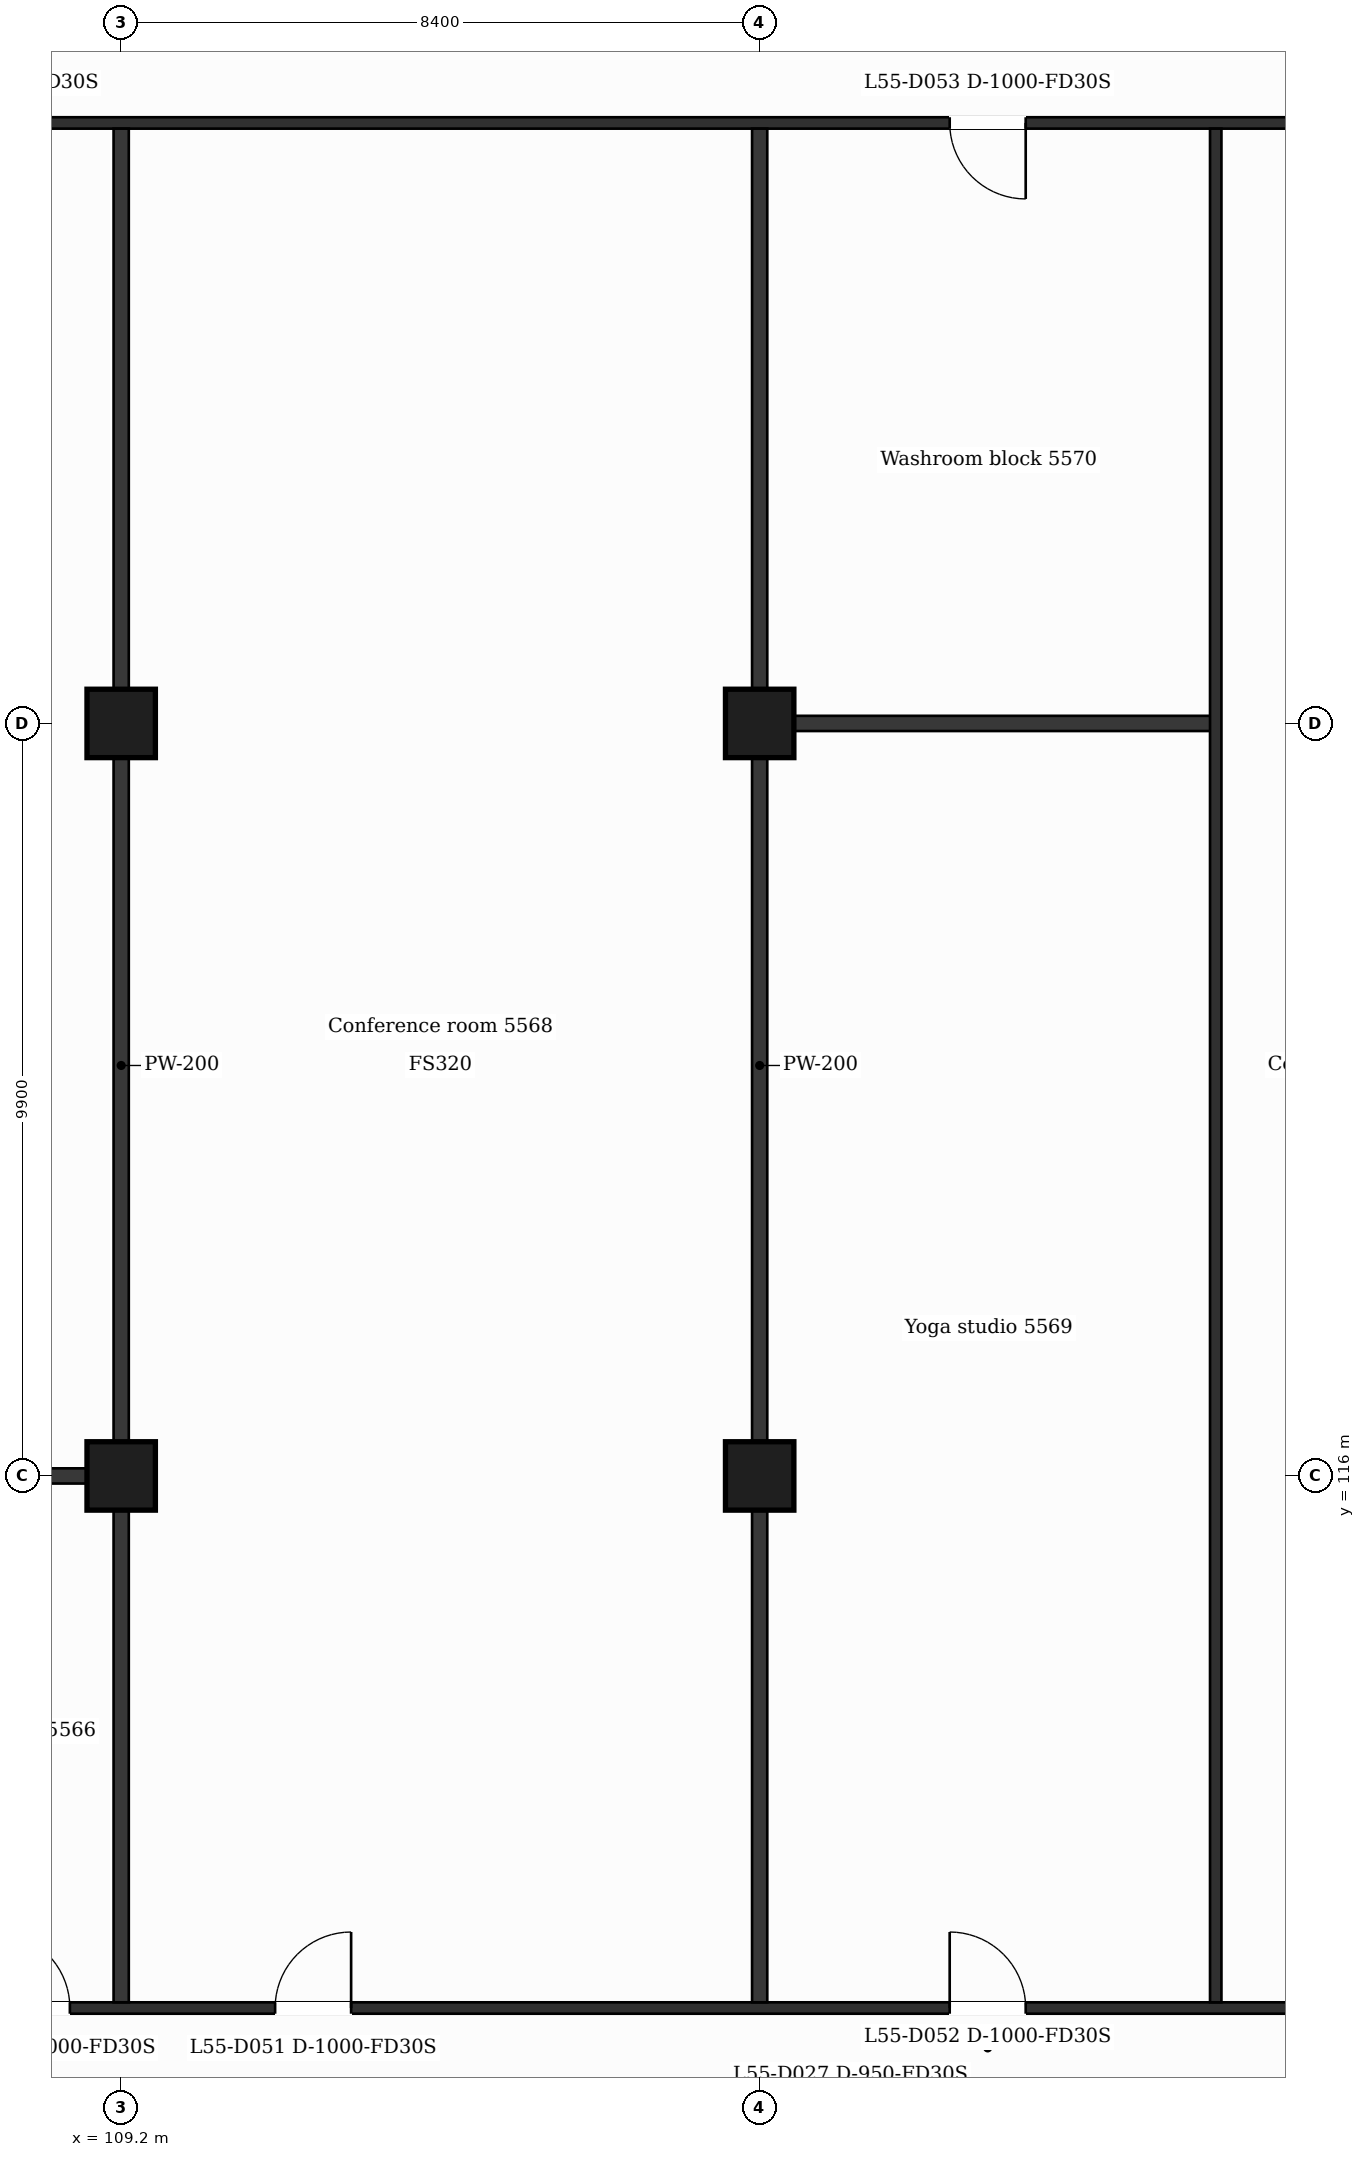
"""IFC4 building model, lengths in metres.
Left out: names, types, materials, properties, quantities, classifications, styles, units other than length and angle.
Written with IfcOpenShell. Run it as: python <this file> out.ifc"""

import sys

from ifc_helpers import new_model, si_unit, direction, frame, frame_2d, origin, origin_2d, place, context, subcontext, project, spatial, rectangle, extrude, element, fill, save


model = new_model("IFC4")
c1 = context("Model", 3, precision=1e-05, world=origin(), true_north=direction((0.0, 1.0)))
c2 = subcontext(c1, "Body", "Model", "MODEL_VIEW")
j1 = project(units=[si_unit("LENGTHUNIT", "METRE"), si_unit("PLANEANGLEUNIT", "RADIAN")], contexts=[c1])
p1 = place(None, origin())
s1 = spatial("IfcSite", under=j1, at=p1, CompositionType="ELEMENT")
p2 = place(p1, origin())
s2 = spatial("IfcBuilding", under=s1, at=p2, CompositionType="ELEMENT")
p3 = place(p2, frame((0.0, 0.0, 228.1)))
s3 = spatial("IfcBuildingStorey", under=s2, at=p3, CompositionType="ELEMENT", Elevation=228.1)
for number, where, z_axis, x_axis in (
    (1, (109.2, 116.0, 0.0), (0.0, 0.0, 1.0), (1.0, 0.0, 0.0)),
    (2, (117.6, 116.0, 0.0), (0.0, 0.0, 1.0), (1.0, 0.0, 0.0)),
    (3, (109.2, 125.9, 0.0), (0.0, 0.0, 1.0), (1.0, 0.0, 0.0)),
    (4, (117.6, 125.9, 0.0), (0.0, 0.0, 1.0), (1.0, 0.0, 0.0)),
):
    element("IfcColumn", number, at=place(p3, frame(where, z_axis=z_axis, x_axis=x_axis)), inside=s3, PredefinedType="COLUMN", context=c2, shape_type="SweptSolid", body=[
        extrude(rectangle(XDim=0.9, YDim=0.9, at=origin_2d()), origin(), (0.0, 0.0, 1.0), 3.7),
    ])
p4 = place(p3, frame((100.725, 109.0, 0.0), z_axis=(0.0, 0.0, 1.0), x_axis=(1.0, 0.0, 0.0)))
e5 = element("IfcWall", 5, at=p4, inside=s3, PredefinedType="PARTITIONING", context=c2, shape_type="SweptSolid", body=[
    extrude(rectangle(XDim=25.35, YDim=0.15, at=frame_2d((12.675, 0.0))), origin(), (0.0, 0.0, 1.0), 3.38),
])
p5 = place(p4, frame((6.8, 0.0, 0.0)))
e6 = element("IfcOpeningElement", 6, at=p5, cuts=e5, PredefinedType="OPENING", context=c2, shape_type="SweptSolid", body=[
    extrude(rectangle(XDim=1.0, YDim=2.1, at=frame_2d((0.5, 1.05))), frame((0.0, 0.085, 0.0), z_axis=(0.0, -1.0, 0.0), x_axis=(1.0, 0.0, 0.0)), (0.0, 0.0, 1.0), 0.17),
])
p6 = place(p4, frame((3.475, 0.0, 0.0)))
e7 = element("IfcOpeningElement", 7, at=p6, cuts=e5, PredefinedType="OPENING", context=c2, shape_type="SweptSolid", body=[
    extrude(rectangle(XDim=1.0, YDim=2.1, at=frame_2d((0.5, 1.05))), frame((0.0, 0.085, 0.0), z_axis=(0.0, -1.0, 0.0), x_axis=(1.0, 0.0, 0.0)), (0.0, 0.0, 1.0), 0.17),
])
p7 = place(p4, frame((10.5, 0.0, 0.0)))
e8 = element("IfcOpeningElement", 8, at=p7, cuts=e5, PredefinedType="OPENING", context=c2, shape_type="SweptSolid", body=[
    extrude(rectangle(XDim=1.0, YDim=2.1, at=frame_2d((0.5, 1.05))), frame((0.0, 0.085, 0.0), z_axis=(0.0, -1.0, 0.0), x_axis=(1.0, 0.0, 0.0)), (0.0, 0.0, 1.0), 0.17),
])
p8 = place(p4, frame((19.375, 0.0, 0.0)))
e9 = element("IfcOpeningElement", 9, at=p8, cuts=e5, PredefinedType="OPENING", context=c2, shape_type="SweptSolid", body=[
    extrude(rectangle(XDim=1.0, YDim=2.1, at=frame_2d((0.5, 1.05))), frame((0.0, 0.085, 0.0), z_axis=(0.0, -1.0, 0.0), x_axis=(1.0, 0.0, 0.0)), (0.0, 0.0, 1.0), 0.17),
])
for number, where, z_axis, x_axis in (
    (10, (103.2, 116.0, 0.0), (0.0, 0.0, 1.0), (1.0, 0.0, 0.0)),
    (11, (117.6, 125.9, 0.0), (0.0, 0.0, 1.0), (1.0, 0.0, 0.0)),
):
    element("IfcWall", number, at=place(p3, frame(where, z_axis=z_axis, x_axis=x_axis)), inside=s3, PredefinedType="PARTITIONING", context=c2, shape_type="SweptSolid", body=[
        extrude(rectangle(XDim=6.0, YDim=0.2, at=frame_2d((3.0, 0.0))), origin(), (0.0, 0.0, 1.0), 3.38),
    ])
p9 = place(p3, frame((100.725, 133.8, 0.0), z_axis=(0.0, 0.0, 1.0), x_axis=(1.0, 0.0, 0.0)))
e12 = element("IfcWall", 12, at=p9, inside=s3, PredefinedType="PARTITIONING", context=c2, shape_type="SweptSolid", body=[
    extrude(rectangle(XDim=25.35, YDim=0.15, at=frame_2d((12.675, 0.0))), origin(), (0.0, 0.0, 1.0), 3.38),
])
p10 = place(p9, frame((6.05, 0.0, 0.0)))
e13 = element("IfcOpeningElement", 13, at=p10, cuts=e12, PredefinedType="OPENING", context=c2, shape_type="SweptSolid", body=[
    extrude(rectangle(XDim=1.0, YDim=2.1, at=frame_2d((0.5, 1.05))), frame((0.0, 0.085, 0.0), z_axis=(0.0, -1.0, 0.0), x_axis=(1.0, 0.0, 0.0)), (0.0, 0.0, 1.0), 0.17),
])
p11 = place(p9, frame((19.375, 0.0, 0.0)))
e14 = element("IfcOpeningElement", 14, at=p11, cuts=e12, PredefinedType="OPENING", context=c2, shape_type="SweptSolid", body=[
    extrude(rectangle(XDim=1.0, YDim=2.1, at=frame_2d((0.5, 1.05))), frame((0.0, 0.085, 0.0), z_axis=(0.0, -1.0, 0.0), x_axis=(1.0, 0.0, 0.0)), (0.0, 0.0, 1.0), 0.17),
])
for number, where, z_axis, x_axis in (
    (15, (109.2, 109.075, 0.0), (0.0, 0.0, 1.0), (0.0, 1.0, 0.0)),
    (16, (117.6, 109.075, 0.0), (0.0, 0.0, 1.0), (0.0, 1.0, 0.0)),
):
    element("IfcWall", number, at=place(p3, frame(where, z_axis=z_axis, x_axis=x_axis)), inside=s3, PredefinedType="PARTITIONING", context=c2, shape_type="SweptSolid", body=[
        extrude(rectangle(XDim=24.65, YDim=0.2, at=frame_2d((12.325, 0.0))), origin(), (0.0, 0.0, 1.0), 3.38),
    ])
p12 = place(p3, frame((123.6, 109.075, 0.0), z_axis=(0.0, 0.0, 1.0), x_axis=(0.0, 1.0, 0.0)))
e17 = element("IfcWall", 17, at=p12, inside=s3, PredefinedType="PARTITIONING", context=c2, shape_type="SweptSolid", body=[
    extrude(rectangle(XDim=24.65, YDim=0.15, at=frame_2d((12.325, 0.0))), origin(), (0.0, 0.0, 1.0), 3.38),
])
p13 = place(p5, origin())
e18 = element("IfcDoor", 18, at=p13, inside=s3, OperationType="SINGLE_SWING_LEFT", PredefinedType="DOOR", context=c2, shape_type="SweptSolid", body=[
    extrude(rectangle(XDim=1.0, YDim=2.1, at=frame_2d((0.5, 1.05))), frame((0.0, 0.025, 0.0), z_axis=(0.0, -1.0, 0.0), x_axis=(1.0, 0.0, 0.0)), (0.0, 0.0, 1.0), 0.05),
])
fill(e6, e18)
p14 = place(p7, origin())
e19 = element("IfcDoor", 19, at=p14, inside=s3, OperationType="SINGLE_SWING_RIGHT", PredefinedType="DOOR", context=c2, shape_type="SweptSolid", body=[
    extrude(rectangle(XDim=1.0, YDim=2.1, at=frame_2d((0.5, 1.05))), frame((0.0, 0.025, 0.0), z_axis=(0.0, -1.0, 0.0), x_axis=(1.0, 0.0, 0.0)), (0.0, 0.0, 1.0), 0.05),
])
fill(e8, e19)
p15 = place(p8, origin())
e20 = element("IfcDoor", 20, at=p15, inside=s3, OperationType="SINGLE_SWING_LEFT", PredefinedType="DOOR", context=c2, shape_type="SweptSolid", body=[
    extrude(rectangle(XDim=1.0, YDim=2.1, at=frame_2d((0.5, 1.05))), frame((0.0, 0.025, 0.0), z_axis=(0.0, -1.0, 0.0), x_axis=(1.0, 0.0, 0.0)), (0.0, 0.0, 1.0), 0.05),
])
fill(e9, e20)
p16 = place(p11, origin())
e21 = element("IfcDoor", 21, at=p16, inside=s3, OperationType="SINGLE_SWING_RIGHT", PredefinedType="DOOR", context=c2, shape_type="SweptSolid", body=[
    extrude(rectangle(XDim=1.0, YDim=2.1, at=frame_2d((0.5, 1.05))), frame((0.0, 0.025, 0.0), z_axis=(0.0, -1.0, 0.0), x_axis=(1.0, 0.0, 0.0)), (0.0, 0.0, 1.0), 0.05),
])
fill(e14, e21)
save(model, sys.argv[1])
